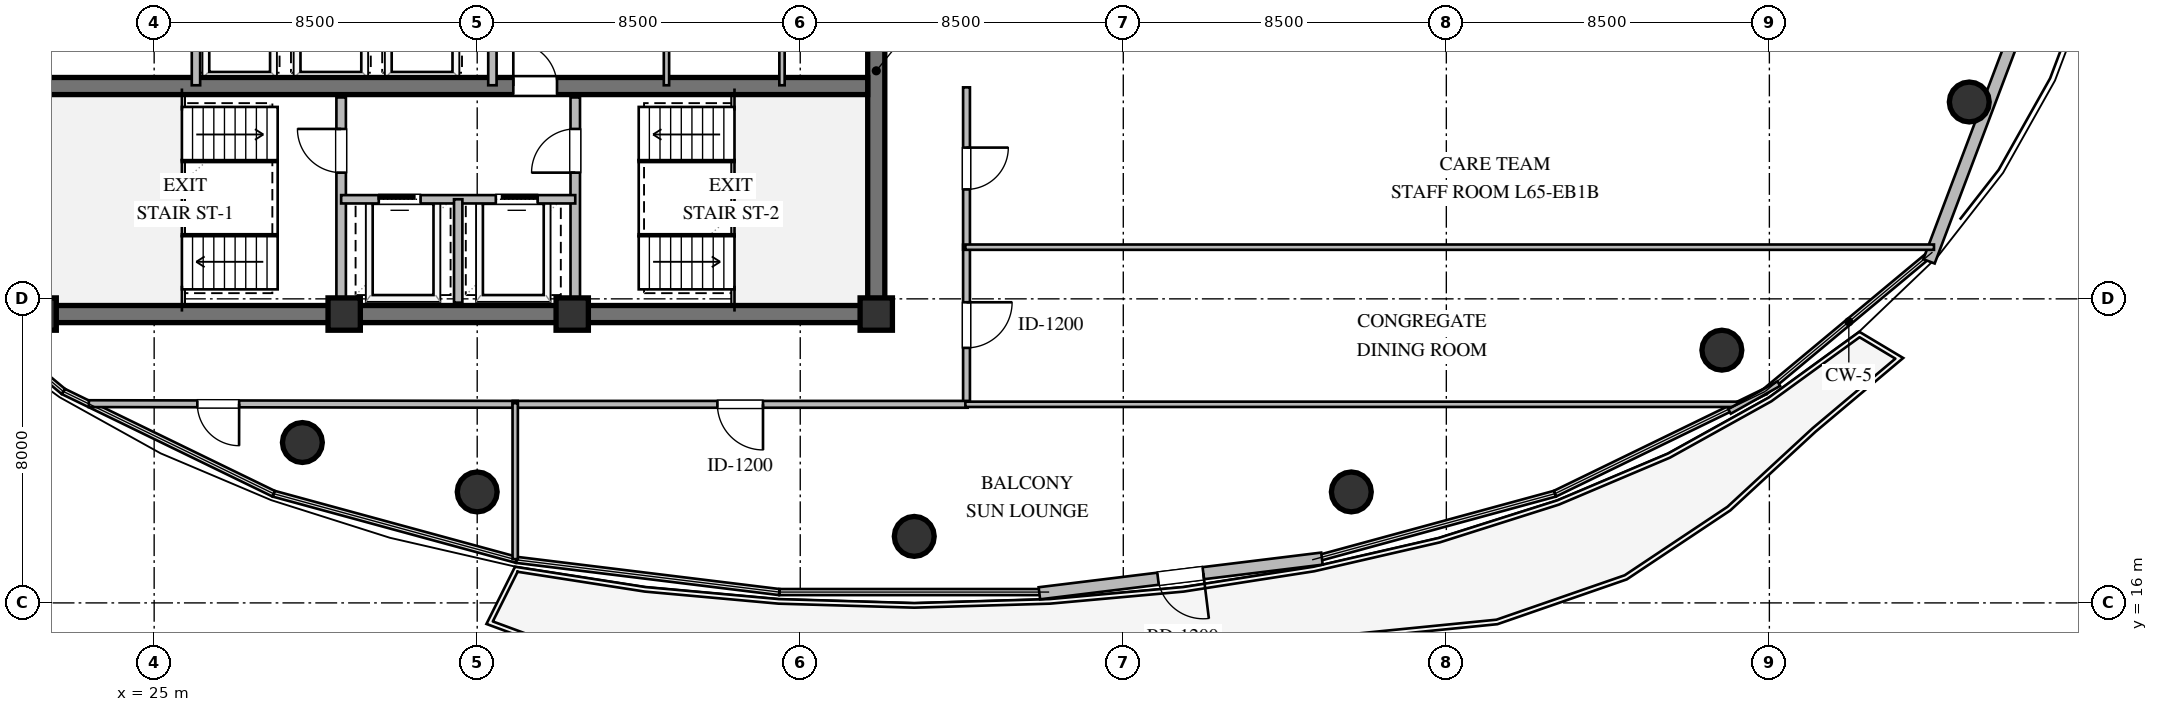
"""IFC4 building model, lengths in metres.
Left out: names, types, materials, properties, quantities, classifications, styles, units other than length and angle.
Written with IfcOpenShell. Run it as: python <this file> out.ifc"""

import sys

from ifc_helpers import new_model, si_unit, direction, frame, frame_2d, origin, origin_2d, place, context, subcontext, project, spatial, rectangle, circle, extrude, element, fill, save


model = new_model("IFC4")
c1 = context("Model", 3, precision=1e-05, world=origin(), true_north=direction((0.0, 1.0)))
c2 = subcontext(c1, "Body", "Model", "MODEL_VIEW")
j1 = project(units=[si_unit("LENGTHUNIT", "METRE"), si_unit("PLANEANGLEUNIT", "RADIAN")], contexts=[c1])
p1 = place(None, origin())
s1 = spatial("IfcSite", under=j1, at=p1, CompositionType="ELEMENT")
p2 = place(p1, origin())
s2 = spatial("IfcBuilding", under=s1, at=p2, CompositionType="ELEMENT")
p3 = place(p2, frame((0.0, 0.0, 246.0)))
s3 = spatial("IfcBuildingStorey", under=s2, at=p3, CompositionType="ELEMENT", Elevation=246.0)
p4 = place(p3, frame((21.775, 23.6, 0.0), z_axis=(0.0, 0.0, 1.0), x_axis=(1.0, 0.0, 0.0)))
e1 = element("IfcWall", 1, at=p4, inside=s3, PredefinedType="SHEAR", context=c2, shape_type="SweptSolid", body=[
    extrude(rectangle(XDim=22.45, YDim=0.45, at=frame_2d((11.225, 0.0))), origin(), (0.0, 0.0, 1.0), 3.36),
])
p5 = place(p3, frame((44.0, 23.825, 0.0), z_axis=(0.0, 0.0, 1.0), x_axis=(0.0, 1.0, 0.0)))
e2 = element("IfcWall", 2, at=p5, inside=s3, PredefinedType="SHEAR", context=c2, shape_type="SweptSolid", body=[
    extrude(rectangle(XDim=12.35, YDim=0.45, at=frame_2d((6.175, 0.0))), origin(), (0.0, 0.0, 1.0), 3.36),
])
p6 = place(p5, frame((8.675, 0.0, 0.0)))
e3 = element("IfcOpeningElement", 3, at=p6, cuts=e2, PredefinedType="OPENING", context=c2, shape_type="SweptSolid", body=[
    extrude(rectangle(XDim=1.5, YDim=2.15, at=frame_2d((0.75, 1.075))), frame((0.0, 0.235, 0.0), z_axis=(0.0, -1.0, 0.0), x_axis=(1.0, 0.0, 0.0)), (0.0, 0.0, 1.0), 0.47),
])
p7 = place(p3, frame((22.225, 29.6, 0.0), z_axis=(0.0, 0.0, 1.0), x_axis=(1.0, 0.0, 0.0)))
e4 = element("IfcWall", 4, at=p7, inside=s3, PredefinedType="SHEAR", context=c2, shape_type="SweptSolid", body=[
    extrude(rectangle(XDim=21.55, YDim=0.45, at=frame_2d((10.775, 0.0))), origin(), (0.0, 0.0, 1.0), 3.36),
])
p8 = place(p7, frame((12.225, 0.0, 0.0)))
e5 = element("IfcOpeningElement", 5, at=p8, cuts=e4, PredefinedType="OPENING", context=c2, shape_type="SweptSolid", body=[
    extrude(rectangle(XDim=1.15, YDim=2.1, at=frame_2d((0.575, 1.05))), frame((0.0, 0.235, 0.0), z_axis=(0.0, -1.0, 0.0), x_axis=(1.0, 0.0, 0.0)), (0.0, 0.0, 1.0), 0.47),
])
for number, where, z_axis, x_axis in (
    (6, (22.0, 23.6, 0.0), (0.0, 0.0, 1.0), (1.0, 0.0, 0.0)),
    (7, (30.0, 23.6, 0.0), (0.0, 0.0, 1.0), (1.0, 0.0, 0.0)),
    (8, (36.0, 23.6, 0.0), (0.0, 0.0, 1.0), (1.0, 0.0, 0.0)),
    (9, (44.0, 23.6, 0.0), (0.0, 0.0, 1.0), (1.0, 0.0, 0.0)),
):
    element("IfcColumn", number, at=place(p3, frame(where, z_axis=z_axis, x_axis=x_axis)), inside=s3, PredefinedType="COLUMN", context=c2, shape_type="SweptSolid", body=[
        extrude(rectangle(XDim=0.85, YDim=0.85, at=origin_2d()), origin(), (0.0, 0.0, 1.0), 3.6),
    ])
for number, where, z_axis, x_axis in (
    (10, (28.9, 20.22, 0.0), (0.0, 0.0, 1.0), (1.0, 0.0, 0.0)),
    (11, (33.5, 18.92, 0.0), (0.0, 0.0, 1.0), (1.0, 0.0, 0.0)),
    (12, (45.0, 17.75, 0.0), (0.0, 0.0, 1.0), (1.0, 0.0, 0.0)),
    (13, (56.5, 18.92, 0.0), (0.0, 0.0, 1.0), (1.0, 0.0, 0.0)),
    (14, (66.25, 22.65, 0.0), (0.0, 0.0, 1.0), (1.0, 0.0, 0.0)),
    (15, (72.76, 29.18, 0.0), (0.0, 0.0, 1.0), (1.0, 0.0, 0.0)),
):
    element("IfcColumn", number, at=place(p3, frame(where, z_axis=z_axis, x_axis=x_axis)), inside=s3, PredefinedType="COLUMN", context=c2, shape_type="SweptSolid", body=[
        extrude(circle(Radius=0.525, at=origin_2d()), origin(), (0.0, 0.0, 1.0), 3.6),
    ])
p9 = place(p3, frame((76.712, 38.243, 0.0), z_axis=(0.0, 0.0, 1.0), x_axis=(-0.353659523244, -0.935374225441, 0.0)))
e16 = element("IfcWall", 16, at=p9, inside=s3, PredefinedType="STANDARD", context=c2, shape_type="SweptSolid", body=[
    extrude(rectangle(XDim=14.172, YDim=0.32, at=frame_2d((7.086, 0.0))), origin(), (0.0, 0.0, 1.0), 3.36),
])
p10 = place(p3, frame((55.727, 17.165, 0.0), z_axis=(0.0, 0.0, 1.0), x_axis=(-0.992559081031, -0.121763995755, 0.0)))
e17 = element("IfcWall", 17, at=p10, inside=s3, PredefinedType="STANDARD", context=c2, shape_type="SweptSolid", body=[
    extrude(rectangle(XDim=7.491, YDim=0.32, at=frame_2d((3.745, 0.0))), origin(), (0.0, 0.0, 1.0), 3.36),
])
p11 = place(p10, frame((3.145, 0.0, 0.0)))
e18 = element("IfcOpeningElement", 18, at=p11, cuts=e17, PredefinedType="OPENING", context=c2, shape_type="SweptSolid", body=[
    extrude(rectangle(XDim=1.2, YDim=2.15, at=frame_2d((0.6, 1.075))), frame((0.0, 0.17, 0.0), z_axis=(0.0, -1.0, 0.0), x_axis=(1.0, 0.0, 0.0)), (0.0, 0.0, 1.0), 0.34),
])
p12 = place(p3, frame((29.92, 23.9, 0.0), z_axis=(0.0, 0.0, 1.0), x_axis=(0.0, 1.0, 0.0)))
e19 = element("IfcWall", 19, at=p12, inside=s3, PredefinedType="SOLIDWALL", context=c2, shape_type="SweptSolid", body=[
    extrude(rectangle(XDim=5.4, YDim=0.25, at=frame_2d((2.7, 0.0))), origin(), (0.0, 0.0, 1.0), 3.36),
])
p13 = place(p12, frame((3.421, 0.0, 0.0)))
e20 = element("IfcOpeningElement", 20, at=p13, cuts=e19, PredefinedType="OPENING", context=c2, shape_type="SweptSolid", body=[
    extrude(rectangle(XDim=1.15, YDim=2.1, at=frame_2d((0.575, 1.05))), frame((0.0, 0.135, 0.0), z_axis=(0.0, -1.0, 0.0), x_axis=(1.0, 0.0, 0.0)), (0.0, 0.0, 1.0), 0.27),
])
p14 = place(p3, frame((36.08, 23.9, 0.0), z_axis=(0.0, 0.0, 1.0), x_axis=(0.0, 1.0, 0.0)))
e21 = element("IfcWall", 21, at=p14, inside=s3, PredefinedType="SOLIDWALL", context=c2, shape_type="SweptSolid", body=[
    extrude(rectangle(XDim=5.4, YDim=0.25, at=frame_2d((2.7, 0.0))), origin(), (0.0, 0.0, 1.0), 3.36),
])
p15 = place(p14, frame((3.421, 0.0, 0.0)))
e22 = element("IfcOpeningElement", 22, at=p15, cuts=e21, PredefinedType="OPENING", context=c2, shape_type="SweptSolid", body=[
    extrude(rectangle(XDim=1.15, YDim=2.1, at=frame_2d((0.575, 1.05))), frame((0.0, 0.135, 0.0), z_axis=(0.0, -1.0, 0.0), x_axis=(1.0, 0.0, 0.0)), (0.0, 0.0, 1.0), 0.27),
])
p16 = place(p3, frame((29.92, 26.62, 0.0), z_axis=(0.0, 0.0, 1.0), x_axis=(1.0, 0.0, 0.0)))
e23 = element("IfcWall", 23, at=p16, inside=s3, PredefinedType="SOLIDWALL", context=c2, shape_type="SweptSolid", body=[
    extrude(rectangle(XDim=6.16, YDim=0.22, at=frame_2d((3.08, 0.0))), origin(), (0.0, 0.0, 1.0), 3.36),
])
p17 = place(p16, frame((0.99, 0.0, 0.0)))
e24 = element("IfcOpeningElement", 24, at=p17, cuts=e23, PredefinedType="OPENING", context=c2, shape_type="SweptSolid", body=[
    extrude(rectangle(XDim=1.1, YDim=2.1, at=frame_2d((0.55, 1.05))), frame((0.0, 0.12, 0.0), z_axis=(0.0, -1.0, 0.0), x_axis=(1.0, 0.0, 0.0)), (0.0, 0.0, 1.0), 0.24),
])
p18 = place(p16, frame((4.07, 0.0, 0.0)))
e25 = element("IfcOpeningElement", 25, at=p18, cuts=e23, PredefinedType="OPENING", context=c2, shape_type="SweptSolid", body=[
    extrude(rectangle(XDim=1.1, YDim=2.1, at=frame_2d((0.55, 1.05))), frame((0.0, 0.12, 0.0), z_axis=(0.0, -1.0, 0.0), x_axis=(1.0, 0.0, 0.0)), (0.0, 0.0, 1.0), 0.24),
])
p19 = place(p3, frame((33.0, 23.9, 0.0), z_axis=(0.0, 0.0, 1.0), x_axis=(0.0, 1.0, 0.0)))
e26 = element("IfcWall", 26, at=p19, inside=s3, PredefinedType="SOLIDWALL", context=c2, shape_type="SweptSolid", body=[
    extrude(rectangle(XDim=2.72, YDim=0.22, at=frame_2d((1.36, 0.0))), origin(), (0.0, 0.0, 1.0), 3.36),
])
for number, where, z_axis, x_axis in (
    (27, (26.1, 29.62, 0.0), (0.0, 0.0, 1.0), (0.0, 1.0, 0.0)),
    (28, (33.9, 29.62, 0.0), (0.0, 0.0, 1.0), (0.0, 1.0, 0.0)),
):
    element("IfcWall", number, at=place(p3, frame(where, z_axis=z_axis, x_axis=x_axis)), inside=s3, PredefinedType="SOLIDWALL", context=c2, shape_type="SweptSolid", body=[
        extrude(rectangle(XDim=2.36, YDim=0.22, at=frame_2d((1.18, 0.0))), origin(), (0.0, 0.0, 1.0), 3.36),
    ])
for number, where, z_axis, x_axis in (
    (29, (38.48, 29.62, 0.0), (0.0, 0.0, 1.0), (0.0, 1.0, 0.0)),
    (30, (41.52, 29.62, 0.0), (0.0, 0.0, 1.0), (0.0, 1.0, 0.0)),
):
    element("IfcWall", number, at=place(p3, frame(where, z_axis=z_axis, x_axis=x_axis)), inside=s3, PredefinedType="PARTITIONING", context=c2, shape_type="SweptSolid", body=[
        extrude(rectangle(XDim=2.36, YDim=0.14, at=frame_2d((1.18, 0.0))), origin(), (0.0, 0.0, 1.0), 3.36),
    ])
p20 = place(p3, frame((46.375, 25.425, 0.0), z_axis=(0.0, 0.0, 1.0), x_axis=(0.0, -1.0, 0.0)))
e31 = element("IfcWall", 31, at=p20, inside=s3, PredefinedType="PARTITIONING", context=c2, shape_type="SweptSolid", body=[
    extrude(rectangle(XDim=4.23, YDim=0.18, at=frame_2d((2.115, 0.0))), origin(), (0.0, 0.0, 1.0), 3.36),
])
p21 = place(p20, frame((1.515, 0.0, 0.0)))
e32 = element("IfcOpeningElement", 32, at=p21, cuts=e31, PredefinedType="OPENING", context=c2, shape_type="SweptSolid", body=[
    extrude(rectangle(XDim=1.2, YDim=2.15, at=frame_2d((0.6, 1.075))), frame((0.0, 0.1, 0.0), z_axis=(0.0, -1.0, 0.0), x_axis=(1.0, 0.0, 0.0)), (0.0, 0.0, 1.0), 0.2),
])
p22 = place(p3, frame((46.375, 29.565, 0.0), z_axis=(0.0, 0.0, 1.0), x_axis=(0.0, -1.0, 0.0)))
e33 = element("IfcWall", 33, at=p22, inside=s3, PredefinedType="PARTITIONING", context=c2, shape_type="SweptSolid", body=[
    extrude(rectangle(XDim=4.27, YDim=0.18, at=frame_2d((2.135, 0.0))), origin(), (0.0, 0.0, 1.0), 3.36),
])
p23 = place(p22, frame((1.585, 0.0, 0.0)))
e34 = element("IfcOpeningElement", 34, at=p23, cuts=e33, PredefinedType="OPENING", context=c2, shape_type="SweptSolid", body=[
    extrude(rectangle(XDim=1.1, YDim=2.1, at=frame_2d((0.55, 1.05))), frame((0.0, 0.1, 0.0), z_axis=(0.0, -1.0, 0.0), x_axis=(1.0, 0.0, 0.0)), (0.0, 0.0, 1.0), 0.2),
])
p24 = place(p3, frame((34.565, 21.225, 0.0), z_axis=(0.0, 0.0, 1.0), x_axis=(-0.999998853153, 0.001514494152, 0.0)))
e35 = element("IfcWall", 35, at=p24, inside=s3, PredefinedType="PARTITIONING", context=c2, shape_type="SweptSolid", body=[
    extrude(rectangle(XDim=11.284, YDim=0.18, at=frame_2d((5.642, 0.0))), origin(), (0.0, 0.0, 1.0), 2.89),
])
p25 = place(p24, frame((7.329, 0.0, 0.0)))
e36 = element("IfcOpeningElement", 36, at=p25, cuts=e35, PredefinedType="OPENING", context=c2, shape_type="SweptSolid", body=[
    extrude(rectangle(XDim=1.1, YDim=2.1, at=frame_2d((0.55, 1.05))), frame((0.0, 0.1, 0.0), z_axis=(0.0, -1.0, 0.0), x_axis=(1.0, 0.0, 0.0)), (0.0, 0.0, 1.0), 0.2),
])
p26 = place(p3, frame((46.405, 21.225, 0.0), z_axis=(0.0, 0.0, 1.0), x_axis=(-1.0, 0.0, 0.0)))
e37 = element("IfcWall", 37, at=p26, inside=s3, PredefinedType="PARTITIONING", context=c2, shape_type="SweptSolid", body=[
    extrude(rectangle(XDim=11.97, YDim=0.18, at=frame_2d((5.985, 0.0))), origin(), (0.0, 0.0, 1.0), 2.996),
])
p27 = place(p26, frame((5.385, 0.0, 0.0)))
e38 = element("IfcOpeningElement", 38, at=p27, cuts=e37, PredefinedType="OPENING", context=c2, shape_type="SweptSolid", body=[
    extrude(rectangle(XDim=1.2, YDim=2.15, at=frame_2d((0.6, 1.075))), frame((0.0, 0.1, 0.0), z_axis=(0.0, -1.0, 0.0), x_axis=(1.0, 0.0, 0.0)), (0.0, 0.0, 1.0), 0.2),
])
p28 = place(p3, frame((46.345, 25.36, 0.0), z_axis=(0.0, 0.0, 1.0), x_axis=(1.0, 0.0, 0.0)))
e39 = element("IfcWall", 39, at=p28, inside=s3, PredefinedType="PARTITIONING", context=c2, shape_type="SweptSolid", body=[
    extrude(rectangle(XDim=25.486, YDim=0.14, at=frame_2d((12.743, 0.0))), origin(), (0.0, 0.0, 1.0), 2.89),
])
p29 = place(p3, frame((66.684, 21.225, 0.0), z_axis=(0.0, 0.0, 1.0), x_axis=(-1.0, 0.0, 0.0)))
e40 = element("IfcWall", 40, at=p29, inside=s3, PredefinedType="PARTITIONING", context=c2, shape_type="SweptSolid", body=[
    extrude(rectangle(XDim=20.339, YDim=0.14, at=frame_2d((10.169, 0.0))), origin(), (0.0, 0.0, 1.0), 2.996),
])
p30 = place(p3, frame((67.748, 21.77, 0.0), z_axis=(0.0, 0.0, 1.0), x_axis=(-0.871352238731, -0.490658003153, 0.0)))
e41 = element("IfcWall", 41, at=p30, inside=s3, PredefinedType="PARTITIONING", context=c2, shape_type="SweptSolid", body=[
    extrude(rectangle(XDim=1.49, YDim=0.14, at=frame_2d((0.745, 0.0))), origin(), (0.0, 0.0, 1.0), 3.36),
])
p31 = place(p3, frame((34.5, 21.255, 0.0), z_axis=(0.0, 0.0, 1.0), x_axis=(0.0, -1.0, 0.0)))
e42 = element("IfcWall", 42, at=p31, inside=s3, PredefinedType="PARTITIONING", context=c2, shape_type="SweptSolid", body=[
    extrude(rectangle(XDim=4.104, YDim=0.14, at=frame_2d((2.052, 0.0))), origin(), (0.0, 0.0, 1.0), 3.36),
])
p32 = place(p11, origin())
e43 = element("IfcDoor", 43, at=p32, inside=s3, OperationType="SINGLE_SWING_LEFT", PredefinedType="DOOR", context=c2, shape_type="SweptSolid", body=[
    extrude(rectangle(XDim=1.2, YDim=2.15, at=frame_2d((0.6, 1.075))), frame((0.0, 0.025, 0.0), z_axis=(0.0, -1.0, 0.0), x_axis=(1.0, 0.0, 0.0)), (0.0, 0.0, 1.0), 0.05),
])
fill(e18, e43)
p33 = place(p13, origin())
e44 = element("IfcDoor", 44, at=p33, inside=s3, OperationType="SINGLE_SWING_RIGHT", PredefinedType="DOOR", context=c2, shape_type="SweptSolid", body=[
    extrude(rectangle(XDim=1.15, YDim=2.1, at=frame_2d((0.575, 1.05))), frame((0.0, 0.025, 0.0), z_axis=(0.0, -1.0, 0.0), x_axis=(1.0, 0.0, 0.0)), (0.0, 0.0, 1.0), 0.05),
])
fill(e20, e44)
p34 = place(p15, origin())
e45 = element("IfcDoor", 45, at=p34, inside=s3, OperationType="SINGLE_SWING_LEFT", PredefinedType="DOOR", context=c2, shape_type="SweptSolid", body=[
    extrude(rectangle(XDim=1.15, YDim=2.1, at=frame_2d((0.575, 1.05))), frame((0.0, 0.025, 0.0), z_axis=(0.0, -1.0, 0.0), x_axis=(1.0, 0.0, 0.0)), (0.0, 0.0, 1.0), 0.05),
])
fill(e22, e45)
p35 = place(p17, origin())
e46 = element("IfcDoor", 46, at=p35, inside=s3, OperationType="SLIDING_TO_LEFT", PredefinedType="DOOR", context=c2, shape_type="SweptSolid", body=[
    extrude(rectangle(XDim=1.1, YDim=2.1, at=frame_2d((0.55, 1.05))), frame((0.0, 0.025, 0.0), z_axis=(0.0, -1.0, 0.0), x_axis=(1.0, 0.0, 0.0)), (0.0, 0.0, 1.0), 0.05),
])
fill(e24, e46)
p36 = place(p18, origin())
e47 = element("IfcDoor", 47, at=p36, inside=s3, OperationType="SLIDING_TO_RIGHT", PredefinedType="DOOR", context=c2, shape_type="SweptSolid", body=[
    extrude(rectangle(XDim=1.1, YDim=2.1, at=frame_2d((0.55, 1.05))), frame((0.0, 0.025, 0.0), z_axis=(0.0, -1.0, 0.0), x_axis=(1.0, 0.0, 0.0)), (0.0, 0.0, 1.0), 0.05),
])
fill(e25, e47)
p37 = place(p8, origin())
e48 = element("IfcDoor", 48, at=p37, inside=s3, OperationType="SINGLE_SWING_LEFT", PredefinedType="DOOR", context=c2, shape_type="SweptSolid", body=[
    extrude(rectangle(XDim=1.15, YDim=2.1, at=frame_2d((0.575, 1.05))), frame((0.0, 0.025, 0.0), z_axis=(0.0, -1.0, 0.0), x_axis=(1.0, 0.0, 0.0)), (0.0, 0.0, 1.0), 0.05),
])
fill(e5, e48)
p38 = place(p21, origin())
e49 = element("IfcDoor", 49, at=p38, inside=s3, OperationType="SINGLE_SWING_LEFT", PredefinedType="DOOR", context=c2, shape_type="SweptSolid", body=[
    extrude(rectangle(XDim=1.2, YDim=2.15, at=frame_2d((0.6, 1.075))), frame((0.0, 0.025, 0.0), z_axis=(0.0, -1.0, 0.0), x_axis=(1.0, 0.0, 0.0)), (0.0, 0.0, 1.0), 0.05),
])
fill(e32, e49)
p39 = place(p23, origin())
e50 = element("IfcDoor", 50, at=p39, inside=s3, OperationType="SINGLE_SWING_LEFT", PredefinedType="DOOR", context=c2, shape_type="SweptSolid", body=[
    extrude(rectangle(XDim=1.1, YDim=2.1, at=frame_2d((0.55, 1.05))), frame((0.0, 0.025, 0.0), z_axis=(0.0, -1.0, 0.0), x_axis=(1.0, 0.0, 0.0)), (0.0, 0.0, 1.0), 0.05),
])
fill(e34, e50)
p40 = place(p25, origin())
e51 = element("IfcDoor", 51, at=p40, inside=s3, OperationType="SINGLE_SWING_LEFT", PredefinedType="DOOR", context=c2, shape_type="SweptSolid", body=[
    extrude(rectangle(XDim=1.1, YDim=2.1, at=frame_2d((0.55, 1.05))), frame((0.0, 0.025, 0.0), z_axis=(0.0, -1.0, 0.0), x_axis=(1.0, 0.0, 0.0)), (0.0, 0.0, 1.0), 0.05),
])
fill(e36, e51)
p41 = place(p27, origin())
e52 = element("IfcDoor", 52, at=p41, inside=s3, OperationType="SINGLE_SWING_LEFT", PredefinedType="DOOR", context=c2, shape_type="SweptSolid", body=[
    extrude(rectangle(XDim=1.2, YDim=2.15, at=frame_2d((0.6, 1.075))), frame((0.0, 0.025, 0.0), z_axis=(0.0, -1.0, 0.0), x_axis=(1.0, 0.0, 0.0)), (0.0, 0.0, 1.0), 0.05),
])
fill(e38, e52)
save(model, sys.argv[1])
